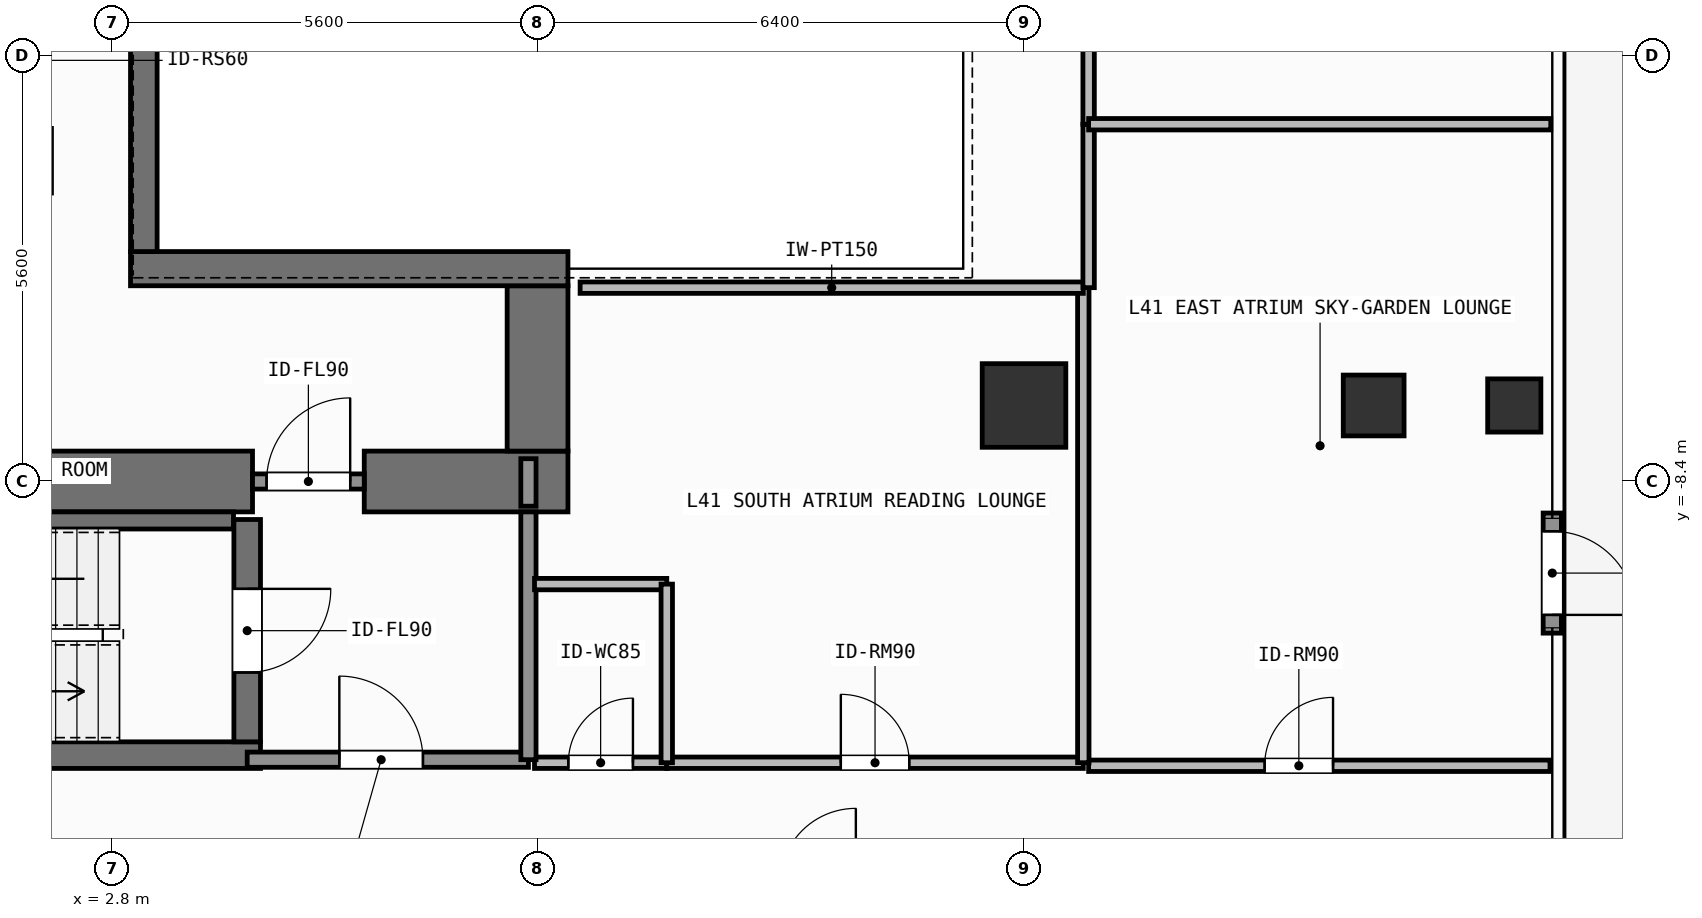
"""IFC4 building model, lengths in metres.
Left out: names, types, materials, properties, quantities, classifications, styles, units other than length and angle.
Written with IfcOpenShell. Run it as: python <this file> out.ifc"""

import sys

from ifc_helpers import new_model, si_unit, direction, frame, frame_2d, origin, origin_2d, place, context, subcontext, project, spatial, rectangle, hollow_rectangle, extrude, element, fill, save


model = new_model("IFC4")
c1 = context("Model", 3, precision=1e-05, world=origin(), true_north=direction((0.0, 1.0)))
c2 = subcontext(c1, "Body", "Model", "MODEL_VIEW")
j1 = project(units=[si_unit("LENGTHUNIT", "METRE"), si_unit("PLANEANGLEUNIT", "RADIAN")], contexts=[c1])
p1 = place(None, origin())
s1 = spatial("IfcSite", under=j1, at=p1, CompositionType="ELEMENT")
p2 = place(p1, origin())
s2 = spatial("IfcBuilding", under=s1, at=p2, CompositionType="ELEMENT")
p3 = place(p2, frame((0.0, 0.0, 168.0)))
s3 = spatial("IfcBuildingStorey", under=s2, at=p3, CompositionType="ELEMENT", Elevation=168.0)
p4 = place(p3, frame((-2.62, -8.4, 0.0), z_axis=(0.0, 0.0, 1.0), x_axis=(1.0, 0.0, 0.0)))
e1 = element("IfcWall", 1, at=p4, inside=s3, PredefinedType="SHEAR", context=c2, shape_type="SweptSolid", body=[
    extrude(rectangle(XDim=7.27, YDim=0.8, at=frame_2d((3.635, 0.0))), origin(), (0.0, 0.0, 1.0), 3.9),
])
p5 = place(p3, frame((6.12, -8.4, 0.0), z_axis=(0.0, 0.0, 1.0), x_axis=(1.0, 0.0, 0.0)))
e2 = element("IfcWall", 2, at=p5, inside=s3, PredefinedType="SHEAR", context=c2, shape_type="SweptSolid", body=[
    extrude(rectangle(XDim=2.68, YDim=0.8, at=frame_2d((1.34, 0.0))), origin(), (0.0, 0.0, 1.0), 3.9),
])
p6 = place(p3, frame((8.4, -8.0, 0.0), z_axis=(0.0, 0.0, 1.0), x_axis=(0.0, 1.0, 0.0)))
e3 = element("IfcWall", 3, at=p6, inside=s3, PredefinedType="SHEAR", context=c2, shape_type="SweptSolid", body=[
    extrude(rectangle(XDim=2.175, YDim=0.8, at=frame_2d((1.087, 0.0))), origin(), (0.0, 0.0, 1.0), 3.9),
])
p7 = place(p3, frame((3.045, -5.6, 0.0), z_axis=(0.0, 0.0, 1.0), x_axis=(1.0, 0.0, 0.0)))
e4 = element("IfcWall", 4, at=p7, inside=s3, PredefinedType="SHEAR", context=c2, shape_type="SweptSolid", body=[
    extrude(rectangle(XDim=5.755, YDim=0.45, at=frame_2d((2.877, 0.0))), origin(), (0.0, 0.0, 1.0), 3.9),
])
p8 = place(p3, frame((3.22, -5.375, 0.0), z_axis=(0.0, 0.0, 1.0), x_axis=(0.0, 1.0, 0.0)))
e5 = element("IfcWall", 5, at=p8, inside=s3, PredefinedType="SHEAR", context=c2, shape_type="SweptSolid", body=[
    extrude(rectangle(XDim=10.75, YDim=0.35, at=frame_2d((5.375, 0.0))), origin(), (0.0, 0.0, 1.0), 3.9),
])
p9 = place(p3, frame((-2.555, -12.0, 0.0), z_axis=(0.0, 0.0, 1.0), x_axis=(1.0, 0.0, 0.0)))
e6 = element("IfcWall", 6, at=p9, inside=s3, PredefinedType="SHEAR", context=c2, shape_type="SweptSolid", body=[
    extrude(rectangle(XDim=7.31, YDim=0.35, at=frame_2d((3.655, 0.0))), origin(), (0.0, 0.0, 1.0), 3.9),
])
p10 = place(p3, frame((-2.2, -8.913, 0.0), z_axis=(0.0, 0.0, 1.0), x_axis=(1.0, 0.0, 0.0)))
e7 = element("IfcWall", 7, at=p10, inside=s3, PredefinedType="SHEAR", context=c2, shape_type="SweptSolid", body=[
    extrude(rectangle(XDim=6.6, YDim=0.225, at=frame_2d((3.3, 0.0))), origin(), (0.0, 0.0, 1.0), 3.9),
])
p11 = place(p3, frame((4.58, -8.9, 0.0), z_axis=(0.0, 0.0, 1.0), x_axis=(0.0, -1.0, 0.0)))
e8 = element("IfcWall", 8, at=p11, inside=s3, PredefinedType="SHEAR", context=c2, shape_type="SweptSolid", body=[
    extrude(rectangle(XDim=2.925, YDim=0.35, at=frame_2d((1.462, 0.0))), origin(), (0.0, 0.0, 1.0), 3.9),
])
p12 = place(p11, frame((0.913, 0.0, 0.0)))
e9 = element("IfcOpeningElement", 9, at=p12, cuts=e8, PredefinedType="OPENING", context=c2, shape_type="SweptSolid", body=[
    extrude(rectangle(XDim=1.1, YDim=2.15, at=frame_2d((0.55, 1.075))), frame((0.0, 0.185, 0.0), z_axis=(0.0, -1.0, 0.0), x_axis=(1.0, 0.0, 0.0)), (0.0, 0.0, 1.0), 0.37),
])
p13 = place(p3, frame((14.8, -7.4, 0.0), z_axis=(0.0, 0.0, 1.0), x_axis=(1.0, 0.0, 0.0)))
e10 = element("IfcColumn", 10, at=p13, inside=s3, PredefinedType="COLUMN", context=c2, shape_type="SweptSolid", body=[
    extrude(rectangle(XDim=1.1, YDim=1.1, at=origin_2d()), origin(), (0.0, 0.0, 1.0), 3.9),
])
p14 = place(p3, frame((19.4, -7.4, 0.0), z_axis=(0.0, 0.0, 1.0), x_axis=(1.0, 0.0, 0.0)))
e11 = element("IfcColumn", 11, at=p14, inside=s3, PredefinedType="COLUMN", context=c2, shape_type="SweptSolid", body=[
    extrude(hollow_rectangle(XDim=0.8, YDim=0.8, WallThickness=0.036, at=origin_2d()), origin(), (0.0, 0.0, 1.0), 3.9),
])
p15 = place(p3, frame((21.25, -7.4, 0.0), z_axis=(0.0, 0.0, 1.0), x_axis=(1.0, 0.0, 0.0)))
e12 = element("IfcColumn", 12, at=p15, inside=s3, PredefinedType="COLUMN", context=c2, shape_type="SweptSolid", body=[
    extrude(hollow_rectangle(XDim=0.7, YDim=0.7, WallThickness=0.032, at=origin_2d()), origin(), (0.0, 0.0, 1.0), 3.9),
])
p16 = place(p3, frame((21.75, -8.815, 0.0), z_axis=(0.0, 0.0, 1.0), x_axis=(0.0, -1.0, 0.0)))
e13 = element("IfcWall", 13, at=p16, inside=s3, PredefinedType="SOLIDWALL", context=c2, shape_type="SweptSolid", body=[
    extrude(rectangle(XDim=1.58, YDim=0.24, at=frame_2d((0.79, 0.0))), origin(), (0.0, 0.0, 1.0), 3.68),
])
p17 = place(p16, frame((0.24, 0.0, 0.0)))
e14 = element("IfcOpeningElement", 14, at=p17, cuts=e13, PredefinedType="OPENING", context=c2, shape_type="SweptSolid", body=[
    extrude(rectangle(XDim=1.1, YDim=2.2, at=frame_2d((0.55, 1.1))), frame((0.0, 0.13, 0.0), z_axis=(0.0, -1.0, 0.0), x_axis=(1.0, 0.0, 0.0)), (0.0, 0.0, 1.0), 0.26),
])
p18 = place(p3, frame((4.58, -12.06, 0.0), z_axis=(0.0, 0.0, 1.0), x_axis=(1.0, 0.0, 0.0)))
e15 = element("IfcWall", 15, at=p18, inside=s3, PredefinedType="SOLIDWALL", context=c2, shape_type="SweptSolid", body=[
    extrude(rectangle(XDim=3.7, YDim=0.2, at=frame_2d((1.85, 0.0))), origin(), (0.0, 0.0, 1.0), 3.68),
])
p19 = place(p18, frame((1.212, 0.0, 0.0)))
e16 = element("IfcOpeningElement", 16, at=p19, cuts=e15, PredefinedType="OPENING", context=c2, shape_type="SweptSolid", body=[
    extrude(rectangle(XDim=1.1, YDim=2.15, at=frame_2d((0.55, 1.075))), frame((0.0, 0.11, 0.0), z_axis=(0.0, -1.0, 0.0), x_axis=(1.0, 0.0, 0.0)), (0.0, 0.0, 1.0), 0.22),
])
p20 = place(p3, frame((4.65, -8.4, 0.0), z_axis=(0.0, 0.0, 1.0), x_axis=(1.0, 0.0, 0.0)))
e17 = element("IfcWall", 17, at=p20, inside=s3, PredefinedType="SOLIDWALL", context=c2, shape_type="SweptSolid", body=[
    extrude(rectangle(XDim=1.47, YDim=0.2, at=frame_2d((0.735, 0.0))), origin(), (0.0, 0.0, 1.0), 2.82),
])
p21 = place(p20, frame((0.185, 0.0, 0.0)))
e18 = element("IfcOpeningElement", 18, at=p21, cuts=e17, PredefinedType="OPENING", context=c2, shape_type="SweptSolid", body=[
    extrude(rectangle(XDim=1.1, YDim=2.15, at=frame_2d((0.55, 1.075))), frame((0.0, 0.11, 0.0), z_axis=(0.0, -1.0, 0.0), x_axis=(1.0, 0.0, 0.0)), (0.0, 0.0, 1.0), 0.22),
])
p22 = place(p3, frame((8.36, -12.1, 0.0), z_axis=(0.0, 0.0, 1.0), x_axis=(1.0, 0.0, 0.0)))
e19 = element("IfcWall", 19, at=p22, inside=s3, PredefinedType="PARTITIONING", context=c2, shape_type="SweptSolid", body=[
    extrude(rectangle(XDim=1.74, YDim=0.15, at=frame_2d((0.87, 0.0))), origin(), (0.0, 0.0, 1.0), 3.68),
])
p23 = place(p22, frame((0.445, 0.0, 0.0)))
e20 = element("IfcOpeningElement", 20, at=p23, cuts=e19, PredefinedType="OPENING", context=c2, shape_type="SweptSolid", body=[
    extrude(rectangle(XDim=0.85, YDim=2.1, at=frame_2d((0.425, 1.05))), frame((0.0, 0.085, 0.0), z_axis=(0.0, -1.0, 0.0), x_axis=(1.0, 0.0, 0.0)), (0.0, 0.0, 1.0), 0.17),
])
p24 = place(p3, frame((10.1, -12.1, 0.0), z_axis=(0.0, 0.0, 1.0), x_axis=(1.0, 0.0, 0.0)))
e21 = element("IfcWall", 21, at=p24, inside=s3, PredefinedType="PARTITIONING", context=c2, shape_type="SweptSolid", body=[
    extrude(rectangle(XDim=5.48, YDim=0.15, at=frame_2d((2.74, 0.0))), origin(), (0.0, 0.0, 1.0), 3.68),
])
p25 = place(p24, frame((2.29, 0.0, 0.0)))
e22 = element("IfcOpeningElement", 22, at=p25, cuts=e21, PredefinedType="OPENING", context=c2, shape_type="SweptSolid", body=[
    extrude(rectangle(XDim=0.9, YDim=2.1, at=frame_2d((0.45, 1.05))), frame((0.0, 0.085, 0.0), z_axis=(0.0, -1.0, 0.0), x_axis=(1.0, 0.0, 0.0)), (0.0, 0.0, 1.0), 0.17),
])
p26 = place(p3, frame((15.65, -12.14, 0.0), z_axis=(0.0, 0.0, 1.0), x_axis=(1.0, 0.0, 0.0)))
e23 = element("IfcWall", 23, at=p26, inside=s3, PredefinedType="PARTITIONING", context=c2, shape_type="SweptSolid", body=[
    extrude(rectangle(XDim=6.07, YDim=0.15, at=frame_2d((3.035, 0.0))), origin(), (0.0, 0.0, 1.0), 3.68),
])
p27 = place(p26, frame((2.316, 0.0, 0.0)))
e24 = element("IfcOpeningElement", 24, at=p27, cuts=e23, PredefinedType="OPENING", context=c2, shape_type="SweptSolid", body=[
    extrude(rectangle(XDim=0.9, YDim=2.1, at=frame_2d((0.45, 1.05))), frame((0.0, 0.085, 0.0), z_axis=(0.0, -1.0, 0.0), x_axis=(1.0, 0.0, 0.0)), (0.0, 0.0, 1.0), 0.17),
])
p28 = place(p3, frame((8.28, -12.06, 0.0), z_axis=(0.0, 0.0, 1.0), x_axis=(0.0, 1.0, 0.0)))
e25 = element("IfcWall", 25, at=p28, inside=s3, PredefinedType="SOLIDWALL", context=c2, shape_type="SweptSolid", body=[
    extrude(rectangle(XDim=3.26, YDim=0.2, at=frame_2d((1.63, 0.0))), origin(), (0.0, 0.0, 1.0), 3.68),
])
p29 = place(p3, frame((8.28, -8.725, 0.0), z_axis=(0.0, 0.0, 1.0), x_axis=(0.0, 1.0, 0.0)))
e26 = element("IfcWall", 26, at=p29, inside=s3, PredefinedType="SOLIDWALL", context=c2, shape_type="SweptSolid", body=[
    extrude(rectangle(XDim=0.625, YDim=0.2, at=frame_2d((0.312, 0.0))), origin(), (0.0, 0.0, 1.0), 3.68),
])
p30 = place(p3, frame((8.36, -9.75, 0.0), z_axis=(0.0, 0.0, 1.0), x_axis=(1.0, 0.0, 0.0)))
e27 = element("IfcWall", 27, at=p30, inside=s3, PredefinedType="PARTITIONING", context=c2, shape_type="SweptSolid", body=[
    extrude(rectangle(XDim=1.74, YDim=0.15, at=frame_2d((0.87, 0.0))), origin(), (0.0, 0.0, 1.0), 3.68),
])
p31 = place(p3, frame((10.1, -12.1, 0.0), z_axis=(0.0, 0.0, 1.0), x_axis=(0.0, 1.0, 0.0)))
e28 = element("IfcWall", 28, at=p31, inside=s3, PredefinedType="PARTITIONING", context=c2, shape_type="SweptSolid", body=[
    extrude(rectangle(XDim=2.35, YDim=0.15, at=frame_2d((1.175, 0.0))), origin(), (0.0, 0.0, 1.0), 3.68),
])
p32 = place(p3, frame((15.58, -12.1, 0.0), z_axis=(0.0, 0.0, 1.0), x_axis=(0.0, 1.0, 0.0)))
e29 = element("IfcWall", 29, at=p32, inside=s3, PredefinedType="PARTITIONING", context=c2, shape_type="SweptSolid", body=[
    extrude(rectangle(XDim=6.25, YDim=0.15, at=frame_2d((3.125, 0.0))), origin(), (0.0, 0.0, 1.0), 3.68),
])
p33 = place(p3, frame((8.96, -5.85, 0.0), z_axis=(0.0, 0.0, 1.0), x_axis=(1.0, 0.0, 0.0)))
e30 = element("IfcWall", 30, at=p33, inside=s3, PredefinedType="PARTITIONING", context=c2, shape_type="SweptSolid", body=[
    extrude(rectangle(XDim=6.62, YDim=0.15, at=frame_2d((3.31, 0.0))), origin(), (0.0, 0.0, 1.0), 3.68),
])
p34 = place(p3, frame((15.65, -5.85, 0.0), z_axis=(0.0, 0.0, 1.0), x_axis=(0.0, 1.0, 0.0)))
e31 = element("IfcWall", 31, at=p34, inside=s3, PredefinedType="PARTITIONING", context=c2, shape_type="SweptSolid", body=[
    extrude(rectangle(XDim=2.15, YDim=0.15, at=frame_2d((1.075, 0.0))), origin(), (0.0, 0.0, 1.0), 3.68),
])
p35 = place(p3, frame((15.65, -3.7, 0.0), z_axis=(0.0, 0.0, 1.0), x_axis=(0.0, 1.0, 0.0)))
e32 = element("IfcWall", 32, at=p35, inside=s3, PredefinedType="PARTITIONING", context=c2, shape_type="SweptSolid", body=[
    extrude(rectangle(XDim=9.55, YDim=0.15, at=frame_2d((4.775, 0.0))), origin(), (0.0, 0.0, 1.0), 3.68),
])
p36 = place(p3, frame((15.65, -3.7, 0.0), z_axis=(0.0, 0.0, 1.0), x_axis=(1.0, 0.0, 0.0)))
e33 = element("IfcWall", 33, at=p36, inside=s3, PredefinedType="PARTITIONING", context=c2, shape_type="SweptSolid", body=[
    extrude(rectangle(XDim=6.08, YDim=0.15, at=frame_2d((3.04, 0.0))), origin(), (0.0, 0.0, 1.0), 3.68),
])
p37 = place(p17, origin())
e34 = element("IfcDoor", 34, at=p37, inside=s3, OperationType="SINGLE_SWING_RIGHT", PredefinedType="DOOR", context=c2, shape_type="SweptSolid", body=[
    extrude(rectangle(XDim=1.1, YDim=2.2, at=frame_2d((0.55, 1.1))), frame((0.0, 0.025, 0.0), z_axis=(0.0, -1.0, 0.0), x_axis=(1.0, 0.0, 0.0)), (0.0, 0.0, 1.0), 0.05),
])
fill(e14, e34)
p38 = place(p12, origin())
e35 = element("IfcDoor", 35, at=p38, inside=s3, OperationType="SINGLE_SWING_LEFT", PredefinedType="DOOR", context=c2, shape_type="SweptSolid", body=[
    extrude(rectangle(XDim=1.1, YDim=2.15, at=frame_2d((0.55, 1.075))), frame((0.0, 0.025, 0.0), z_axis=(0.0, -1.0, 0.0), x_axis=(1.0, 0.0, 0.0)), (0.0, 0.0, 1.0), 0.05),
])
fill(e9, e35)
p39 = place(p19, origin())
e36 = element("IfcDoor", 36, at=p39, inside=s3, OperationType="SINGLE_SWING_LEFT", PredefinedType="DOOR", context=c2, shape_type="SweptSolid", body=[
    extrude(rectangle(XDim=1.1, YDim=2.15, at=frame_2d((0.55, 1.075))), frame((0.0, 0.025, 0.0), z_axis=(0.0, -1.0, 0.0), x_axis=(1.0, 0.0, 0.0)), (0.0, 0.0, 1.0), 0.05),
])
fill(e16, e36)
p40 = place(p21, origin())
e37 = element("IfcDoor", 37, at=p40, inside=s3, OperationType="SINGLE_SWING_RIGHT", PredefinedType="DOOR", context=c2, shape_type="SweptSolid", body=[
    extrude(rectangle(XDim=1.1, YDim=2.15, at=frame_2d((0.55, 1.075))), frame((0.0, 0.025, 0.0), z_axis=(0.0, -1.0, 0.0), x_axis=(1.0, 0.0, 0.0)), (0.0, 0.0, 1.0), 0.05),
])
fill(e18, e37)
p41 = place(p23, origin())
e38 = element("IfcDoor", 38, at=p41, inside=s3, OperationType="SINGLE_SWING_RIGHT", PredefinedType="DOOR", context=c2, shape_type="SweptSolid", body=[
    extrude(rectangle(XDim=0.85, YDim=2.1, at=frame_2d((0.425, 1.05))), frame((0.0, 0.025, 0.0), z_axis=(0.0, -1.0, 0.0), x_axis=(1.0, 0.0, 0.0)), (0.0, 0.0, 1.0), 0.05),
])
fill(e20, e38)
p42 = place(p25, origin())
e39 = element("IfcDoor", 39, at=p42, inside=s3, OperationType="SINGLE_SWING_LEFT", PredefinedType="DOOR", context=c2, shape_type="SweptSolid", body=[
    extrude(rectangle(XDim=0.9, YDim=2.1, at=frame_2d((0.45, 1.05))), frame((0.0, 0.025, 0.0), z_axis=(0.0, -1.0, 0.0), x_axis=(1.0, 0.0, 0.0)), (0.0, 0.0, 1.0), 0.05),
])
fill(e22, e39)
p43 = place(p27, origin())
e40 = element("IfcDoor", 40, at=p43, inside=s3, OperationType="SINGLE_SWING_RIGHT", PredefinedType="DOOR", context=c2, shape_type="SweptSolid", body=[
    extrude(rectangle(XDim=0.9, YDim=2.1, at=frame_2d((0.45, 1.05))), frame((0.0, 0.025, 0.0), z_axis=(0.0, -1.0, 0.0), x_axis=(1.0, 0.0, 0.0)), (0.0, 0.0, 1.0), 0.05),
])
fill(e24, e40)
save(model, sys.argv[1])
